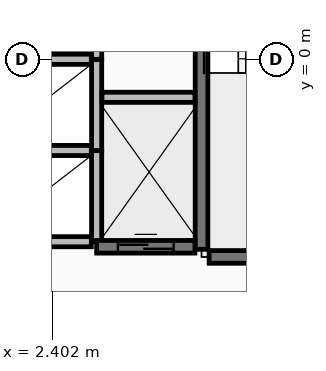
"""IFC4 building model, lengths in metres.
Left out: names, types, materials, properties, quantities, classifications, styles, units other than length and angle.
Written with IfcOpenShell. Run it as: python <this file> out.ifc"""

import sys

from ifc_helpers import new_model, si_unit, direction, frame, frame_2d, origin, place, context, subcontext, project, spatial, rectangle, extrude, element, fill, save


model = new_model("IFC4")
c1 = context("Model", 3, precision=1e-05, world=origin(), true_north=direction((0.0, 1.0)))
c2 = subcontext(c1, "Body", "Model", "MODEL_VIEW")
j1 = project(units=[si_unit("LENGTHUNIT", "METRE"), si_unit("PLANEANGLEUNIT", "RADIAN")], contexts=[c1])
p1 = place(None, origin())
s1 = spatial("IfcSite", under=j1, at=p1, CompositionType="ELEMENT")
p2 = place(p1, origin())
s2 = spatial("IfcBuilding", under=s1, at=p2, CompositionType="ELEMENT")
p3 = place(p2, frame((0.0, 0.0, 149.6)))
s3 = spatial("IfcBuildingStorey", under=s2, at=p3, CompositionType="ELEMENT", Elevation=149.6)
p4 = place(p3, frame((5.35, -3.75, 0.0), z_axis=(0.0, 0.0, 1.0), x_axis=(0.0, 1.0, 0.0)))
e1 = element("IfcWall", 1, at=p4, inside=s3, PredefinedType="SHEAR", context=c2, shape_type="SweptSolid", body=[
    extrude(rectangle(XDim=7.3, YDim=0.25, at=frame_2d((3.65, 0.0))), origin(), (0.0, 0.0, 1.0), 3.41),
])
p5 = place(p3, frame((5.5, -3.9, 0.0), z_axis=(0.0, 0.0, 1.0), x_axis=(1.0, 0.0, 0.0)))
e2 = element("IfcWall", 2, at=p5, inside=s3, PredefinedType="SHEAR", context=c2, shape_type="SweptSolid", body=[
    extrude(rectangle(XDim=3.0, YDim=0.25, at=frame_2d((1.5, 0.0))), origin(), (0.0, 0.0, 1.0), 3.41),
])
p6 = place(p3, frame((3.28, -3.6, 0.0), z_axis=(0.0, 0.0, 1.0), x_axis=(0.0, 1.0, 0.0)))
e3 = element("IfcWall", 3, at=p6, inside=s3, PredefinedType="PARTITIONING", context=c2, shape_type="SweptSolid", body=[
    extrude(rectangle(XDim=1.8, YDim=0.2, at=frame_2d((0.9, 0.0))), origin(), (0.0, 0.0, 1.0), 3.41),
])
for number, where, z_axis, x_axis in (
    (4, (1.13, -3.6, 0.0), (0.0, 0.0, 1.0), (1.0, 0.0, 0.0)),
    (5, (1.13, -1.8, 0.0), (0.0, 0.0, 1.0), (1.0, 0.0, 0.0)),
):
    element("IfcWall", number, at=place(p3, frame(where, z_axis=z_axis, x_axis=x_axis)), inside=s3, PredefinedType="PARTITIONING", context=c2, shape_type="SweptSolid", body=[
        extrude(rectangle(XDim=2.045, YDim=0.2, at=frame_2d((1.022, 0.0))), origin(), (0.0, 0.0, 1.0), 3.41),
    ])
p7 = place(p3, frame((3.28, -1.8, 0.0), z_axis=(0.0, 0.0, 1.0), x_axis=(0.0, 1.0, 0.0)))
e6 = element("IfcWall", 6, at=p7, inside=s3, PredefinedType="PARTITIONING", context=c2, shape_type="SweptSolid", body=[
    extrude(rectangle(XDim=1.8, YDim=0.2, at=frame_2d((0.9, 0.0))), origin(), (0.0, 0.0, 1.0), 3.41),
])
p8 = place(p3, frame((1.13, 0.0, 0.0), z_axis=(0.0, 0.0, 1.0), x_axis=(1.0, 0.0, 0.0)))
e7 = element("IfcWall", 7, at=p8, inside=s3, PredefinedType="PARTITIONING", context=c2, shape_type="SweptSolid", body=[
    extrude(rectangle(XDim=2.045, YDim=0.2, at=frame_2d((1.022, 0.0))), origin(), (0.0, 0.0, 1.0), 3.41),
])
p9 = place(p3, frame((3.28, 0.0, 0.0), z_axis=(0.0, 0.0, 1.0), x_axis=(0.0, 1.0, 0.0)))
e8 = element("IfcWall", 8, at=p9, inside=s3, PredefinedType="PARTITIONING", context=c2, shape_type="SweptSolid", body=[
    extrude(rectangle(XDim=1.8, YDim=0.2, at=frame_2d((0.9, 0.0))), origin(), (0.0, 0.0, 1.0), 3.41),
])
p10 = place(p3, frame((3.28, -3.7, 0.0), z_axis=(0.0, 0.0, 1.0), x_axis=(1.0, 0.0, 0.0)))
e9 = element("IfcWall", 9, at=p10, inside=s3, PredefinedType="SHEAR", context=c2, shape_type="SweptSolid", body=[
    extrude(rectangle(XDim=1.94, YDim=0.25, at=frame_2d((0.97, 0.0))), origin(), (0.0, 0.0, 1.0), 3.41),
])
p11 = place(p10, frame((0.42, 0.0, 0.0)))
e10 = element("IfcOpeningElement", 10, at=p11, cuts=e9, PredefinedType="OPENING", context=c2, shape_type="SweptSolid", body=[
    extrude(rectangle(XDim=1.1, YDim=2.2, at=frame_2d((0.55, 1.1))), frame((0.0, 0.135, 0.0), z_axis=(0.0, -1.0, 0.0), x_axis=(1.0, 0.0, 0.0)), (0.0, 0.0, 1.0), 0.27),
])
p12 = place(p3, frame((3.385, -0.75, 0.0), z_axis=(0.0, 0.0, 1.0), x_axis=(1.0, 0.0, 0.0)))
e11 = element("IfcWall", 11, at=p12, inside=s3, PredefinedType="PARTITIONING", context=c2, shape_type="SweptSolid", body=[
    extrude(rectangle(XDim=1.835, YDim=0.2, at=frame_2d((0.917, 0.0))), origin(), (0.0, 0.0, 1.0), 3.41),
])
p13 = place(p11, origin())
e12 = element("IfcDoor", 12, at=p13, inside=s3, OperationType="SLIDING_TO_LEFT", PredefinedType="DOOR", context=c2, shape_type="SweptSolid", body=[
    extrude(rectangle(XDim=1.1, YDim=2.2, at=frame_2d((0.55, 1.1))), frame((0.0, 0.025, 0.0), z_axis=(0.0, -1.0, 0.0), x_axis=(1.0, 0.0, 0.0)), (0.0, 0.0, 1.0), 0.05),
])
fill(e10, e12)
save(model, sys.argv[1])
